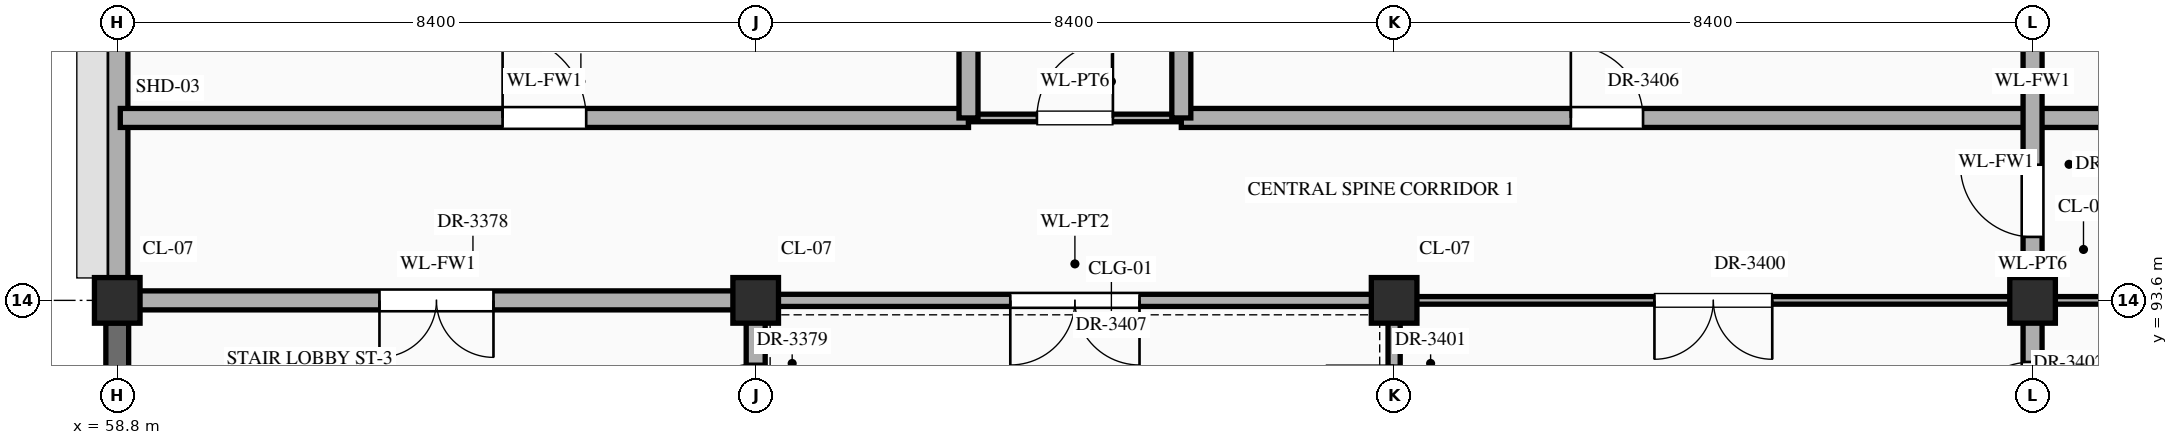
"""IFC4 building model, lengths in metres.
Left out: names, types, materials, properties, quantities, classifications, styles, units other than length and angle.
Written with IfcOpenShell. Run it as: python <this file> out.ifc"""

import sys

from ifc_helpers import new_model, si_unit, direction, frame, frame_2d, origin, origin_2d, place, context, subcontext, project, spatial, rectangle, extrude, element, fill, save


model = new_model("IFC4")
c1 = context("Model", 3, precision=1e-05, world=origin(), true_north=direction((0.0, 1.0)))
c2 = subcontext(c1, "Body", "Model", "MODEL_VIEW")
j1 = project(units=[si_unit("LENGTHUNIT", "METRE"), si_unit("PLANEANGLEUNIT", "RADIAN")], contexts=[c1])
p1 = place(None, origin())
s1 = spatial("IfcSite", under=j1, at=p1, CompositionType="ELEMENT")
p2 = place(p1, origin())
s2 = spatial("IfcBuilding", under=s1, at=p2, CompositionType="ELEMENT")
p3 = place(p2, frame((0.0, 0.0, 68.7)))
s3 = spatial("IfcBuildingStorey", under=s2, at=p3, CompositionType="ELEMENT", Elevation=68.7)
for number, where, z_axis, x_axis in (
    (1, (58.8, 93.6, 0.0), (0.0, 0.0, 1.0), (1.0, 0.0, 0.0)),
    (2, (67.2, 93.6, 0.0), (0.0, 0.0, 1.0), (1.0, 0.0, 0.0)),
    (3, (75.6, 93.6, 0.0), (0.0, 0.0, 1.0), (1.0, 0.0, 0.0)),
    (4, (84.0, 93.6, 0.0), (0.0, 0.0, 1.0), (1.0, 0.0, 0.0)),
):
    element("IfcColumn", number, at=place(p3, frame(where, z_axis=z_axis, x_axis=x_axis)), inside=s3, PredefinedType="COLUMN", context=c2, shape_type="SweptSolid", body=[
        extrude(rectangle(XDim=0.6, YDim=0.6, at=origin_2d()), origin(), (0.0, 0.0, 1.0), 4.5),
    ])
p4 = place(p3, frame((58.8, 86.695, 0.0), z_axis=(0.0, 0.0, 1.0), x_axis=(0.0, 1.0, 0.0)))
e5 = element("IfcWall", 5, at=p4, inside=s3, PredefinedType="SHEAR", context=c2, shape_type="SweptSolid", body=[
    extrude(rectangle(XDim=6.61, YDim=0.3, at=frame_2d((3.305, 0.0))), origin(), (0.0, 0.0, 1.0), 4.12),
])
p5 = place(p3, frame((58.8, 93.895, 0.0), z_axis=(0.0, 0.0, 1.0), x_axis=(0.0, 1.0, 0.0)))
e6 = element("IfcWall", 6, at=p5, inside=s3, PredefinedType="STANDARD", context=c2, shape_type="SweptSolid", body=[
    extrude(rectangle(XDim=6.61, YDim=0.28, at=frame_2d((3.305, 0.0))), origin(), (0.0, 0.0, 1.0), 3.47),
])
p6 = place(p5, frame((4.005, 0.0, 0.85)))
e7 = element("IfcOpeningElement", 7, at=p6, cuts=e6, PredefinedType="OPENING", context=c2, shape_type="SweptSolid", body=[
    extrude(rectangle(XDim=1.2, YDim=1.56, at=frame_2d((0.6, 0.78))), frame((0.0, 0.152, 0.0), z_axis=(0.0, -1.0, 0.0), x_axis=(1.0, 0.0, 0.0)), (0.0, 0.0, 1.0), 0.304),
])
p7 = place(p3, frame((58.84, 93.6, 0.0), z_axis=(0.0, 0.0, 1.0), x_axis=(1.0, 0.0, 0.0)))
e8 = element("IfcWall", 8, at=p7, inside=s3, PredefinedType="STANDARD", context=c2, shape_type="SweptSolid", body=[
    extrude(rectangle(XDim=8.36, YDim=0.25, at=frame_2d((4.18, 0.0))), origin(), (0.0, 0.0, 1.0), 3.27),
])
p8 = place(p7, frame((3.41, 0.0, 0.0)))
e9 = element("IfcOpeningElement", 9, at=p8, cuts=e8, PredefinedType="OPENING", context=c2, shape_type="SweptSolid", body=[
    extrude(rectangle(XDim=1.5, YDim=2.25, at=frame_2d((0.75, 1.125))), frame((0.0, 0.137, 0.0), z_axis=(0.0, -1.0, 0.0), x_axis=(1.0, 0.0, 0.0)), (0.0, 0.0, 1.0), 0.274),
])
p9 = place(p3, frame((67.2, 93.6, 0.0), z_axis=(0.0, 0.0, 1.0), x_axis=(1.0, 0.0, 0.0)))
e10 = element("IfcWall", 10, at=p9, inside=s3, PredefinedType="STANDARD", context=c2, shape_type="SweptSolid", body=[
    extrude(rectangle(XDim=8.4, YDim=0.16, at=frame_2d((4.2, 0.0))), origin(), (0.0, 0.0, 1.0), 3.27),
])
p10 = place(p9, frame((3.35, 0.0, 0.0)))
e11 = element("IfcOpeningElement", 11, at=p10, cuts=e10, PredefinedType="OPENING", context=c2, shape_type="SweptSolid", body=[
    extrude(rectangle(XDim=1.7, YDim=2.45, at=frame_2d((0.85, 1.225))), frame((0.0, 0.092, 0.0), z_axis=(0.0, -1.0, 0.0), x_axis=(1.0, 0.0, 0.0)), (0.0, 0.0, 1.0), 0.184),
])
p11 = place(p3, frame((75.6, 93.6, 0.0), z_axis=(0.0, 0.0, 1.0), x_axis=(1.0, 0.0, 0.0)))
e12 = element("IfcWall", 12, at=p11, inside=s3, PredefinedType="STANDARD", context=c2, shape_type="SweptSolid", body=[
    extrude(rectangle(XDim=16.8, YDim=0.1, at=frame_2d((8.4, 0.0))), origin(), (0.0, 0.0, 1.0), 3.27),
])
p12 = place(p11, frame((3.425, 0.0, 0.0)))
e13 = element("IfcOpeningElement", 13, at=p12, cuts=e12, PredefinedType="OPENING", context=c2, shape_type="SweptSolid", body=[
    extrude(rectangle(XDim=1.55, YDim=2.35, at=frame_2d((0.775, 1.175))), frame((0.0, 0.062, 0.0), z_axis=(0.0, -1.0, 0.0), x_axis=(1.0, 0.0, 0.0)), (0.0, 0.0, 1.0), 0.124),
])
p13 = place(p11, frame((11.98, 0.0, 0.0)))
e14 = element("IfcOpeningElement", 14, at=p13, cuts=e12, PredefinedType="OPENING", context=c2, shape_type="SweptSolid", body=[
    extrude(rectangle(XDim=1.24, YDim=2.3, at=frame_2d((0.62, 1.15))), frame((0.0, 0.062, 0.0), z_axis=(0.0, -1.0, 0.0), x_axis=(1.0, 0.0, 0.0)), (0.0, 0.0, 1.0), 0.124),
])
p14 = place(p3, frame((58.84, 96.0, 0.0), z_axis=(0.0, 0.0, 1.0), x_axis=(1.0, 0.0, 0.0)))
e15 = element("IfcWall", 15, at=p14, inside=s3, PredefinedType="STANDARD", context=c2, shape_type="SweptSolid", body=[
    extrude(rectangle(XDim=11.16, YDim=0.25, at=frame_2d((5.58, 0.0))), origin(), (0.0, 0.0, 1.0), 4.12),
])
p15 = place(p14, frame((5.03, 0.0, 0.0)))
e16 = element("IfcOpeningElement", 16, at=p15, cuts=e15, PredefinedType="OPENING", context=c2, shape_type="SweptSolid", body=[
    extrude(rectangle(XDim=1.1, YDim=2.2, at=frame_2d((0.55, 1.1))), frame((0.0, 0.137, 0.0), z_axis=(0.0, -1.0, 0.0), x_axis=(1.0, 0.0, 0.0)), (0.0, 0.0, 1.0), 0.274),
])
p16 = place(p3, frame((70.0, 96.0, 0.0), z_axis=(0.0, 0.0, 1.0), x_axis=(1.0, 0.0, 0.0)))
e17 = element("IfcWall", 17, at=p16, inside=s3, PredefinedType="STANDARD", context=c2, shape_type="SweptSolid", body=[
    extrude(rectangle(XDim=2.8, YDim=0.1, at=frame_2d((1.4, 0.0))), origin(), (0.0, 0.0, 1.0), 4.12),
])
p17 = place(p16, frame((0.9, 0.0, 0.0)))
e18 = element("IfcOpeningElement", 18, at=p17, cuts=e17, PredefinedType="OPENING", context=c2, shape_type="SweptSolid", body=[
    extrude(rectangle(XDim=1.0, YDim=2.25, at=frame_2d((0.5, 1.125))), frame((0.0, 0.062, 0.0), z_axis=(0.0, -1.0, 0.0), x_axis=(1.0, 0.0, 0.0)), (0.0, 0.0, 1.0), 0.124),
])
p18 = place(p3, frame((72.8, 96.0, 0.0), z_axis=(0.0, 0.0, 1.0), x_axis=(1.0, 0.0, 0.0)))
e19 = element("IfcWall", 19, at=p18, inside=s3, PredefinedType="STANDARD", context=c2, shape_type="SweptSolid", body=[
    extrude(rectangle(XDim=22.4, YDim=0.25, at=frame_2d((11.2, 0.0))), origin(), (0.0, 0.0, 1.0), 4.12),
])
p19 = place(p18, frame((5.125, 0.0, 0.0)))
e20 = element("IfcOpeningElement", 20, at=p19, cuts=e19, PredefinedType="OPENING", context=c2, shape_type="SweptSolid", body=[
    extrude(rectangle(XDim=0.95, YDim=2.15, at=frame_2d((0.475, 1.075))), frame((0.0, 0.137, 0.0), z_axis=(0.0, -1.0, 0.0), x_axis=(1.0, 0.0, 0.0)), (0.0, 0.0, 1.0), 0.274),
])
p20 = place(p18, frame((16.3, 0.0, 0.0)))
e21 = element("IfcOpeningElement", 21, at=p20, cuts=e19, PredefinedType="OPENING", context=c2, shape_type="SweptSolid", body=[
    extrude(rectangle(XDim=1.0, YDim=2.2, at=frame_2d((0.5, 1.1))), frame((0.0, 0.137, 0.0), z_axis=(0.0, -1.0, 0.0), x_axis=(1.0, 0.0, 0.0)), (0.0, 0.0, 1.0), 0.274),
])
p21 = place(p3, frame((67.2, 91.2, 0.0), z_axis=(0.0, 0.0, 1.0), x_axis=(0.0, 1.0, 0.0)))
e22 = element("IfcWall", 22, at=p21, inside=s3, PredefinedType="STANDARD", context=c2, shape_type="SweptSolid", body=[
    extrude(rectangle(XDim=2.4, YDim=0.25, at=frame_2d((1.2, 0.0))), origin(), (0.0, 0.0, 1.0), 3.37),
])
p22 = place(p21, frame((0.615, 0.0, 0.0)))
e23 = element("IfcOpeningElement", 23, at=p22, cuts=e22, PredefinedType="OPENING", context=c2, shape_type="SweptSolid", body=[
    extrude(rectangle(XDim=0.95, YDim=2.15, at=frame_2d((0.475, 1.075))), frame((0.0, 0.137, 0.0), z_axis=(0.0, -1.0, 0.0), x_axis=(1.0, 0.0, 0.0)), (0.0, 0.0, 1.0), 0.274),
])
p23 = place(p3, frame((70.0, 96.0, 0.0), z_axis=(0.0, 0.0, 1.0), x_axis=(0.0, 1.0, 0.0)))
e24 = element("IfcWall", 24, at=p23, inside=s3, PredefinedType="STANDARD", context=c2, shape_type="SweptSolid", body=[
    extrude(rectangle(XDim=4.8, YDim=0.25, at=frame_2d((2.4, 0.0))), origin(), (0.0, 0.0, 1.0), 4.12),
])
p24 = place(p23, frame((1.85, 0.0, 0.0)))
e25 = element("IfcOpeningElement", 25, at=p24, cuts=e24, PredefinedType="OPENING", context=c2, shape_type="SweptSolid", body=[
    extrude(rectangle(XDim=1.1, YDim=2.2, at=frame_2d((0.55, 1.1))), frame((0.0, 0.137, 0.0), z_axis=(0.0, -1.0, 0.0), x_axis=(1.0, 0.0, 0.0)), (0.0, 0.0, 1.0), 0.274),
])
p25 = place(p3, frame((72.8, 96.0, 0.0), z_axis=(0.0, 0.0, 1.0), x_axis=(0.0, 1.0, 0.0)))
e26 = element("IfcWall", 26, at=p25, inside=s3, PredefinedType="STANDARD", context=c2, shape_type="SweptSolid", body=[
    extrude(rectangle(XDim=4.8, YDim=0.25, at=frame_2d((2.4, 0.0))), origin(), (0.0, 0.0, 1.0), 4.12),
])
p26 = place(p25, frame((1.9, 0.0, 0.0)))
e27 = element("IfcOpeningElement", 27, at=p26, cuts=e26, PredefinedType="OPENING", context=c2, shape_type="SweptSolid", body=[
    extrude(rectangle(XDim=1.0, YDim=2.2, at=frame_2d((0.5, 1.1))), frame((0.0, 0.137, 0.0), z_axis=(0.0, -1.0, 0.0), x_axis=(1.0, 0.0, 0.0)), (0.0, 0.0, 1.0), 0.274),
])
p27 = place(p3, frame((75.6, 91.2, 0.0), z_axis=(0.0, 0.0, 1.0), x_axis=(0.0, 1.0, 0.0)))
e28 = element("IfcWall", 28, at=p27, inside=s3, PredefinedType="STANDARD", context=c2, shape_type="SweptSolid", body=[
    extrude(rectangle(XDim=2.4, YDim=0.16, at=frame_2d((1.2, 0.0))), origin(), (0.0, 0.0, 1.0), 3.37),
])
p28 = place(p27, frame((0.64, 0.0, 0.0)))
e29 = element("IfcOpeningElement", 29, at=p28, cuts=e28, PredefinedType="OPENING", context=c2, shape_type="SweptSolid", body=[
    extrude(rectangle(XDim=0.9, YDim=2.15, at=frame_2d((0.45, 1.075))), frame((0.0, 0.092, 0.0), z_axis=(0.0, -1.0, 0.0), x_axis=(1.0, 0.0, 0.0)), (0.0, 0.0, 1.0), 0.184),
])
p29 = place(p3, frame((84.0, 86.44, 0.0), z_axis=(0.0, 0.0, 1.0), x_axis=(0.0, 1.0, 0.0)))
e30 = element("IfcWall", 30, at=p29, inside=s3, PredefinedType="STANDARD", context=c2, shape_type="SweptSolid", body=[
    extrude(rectangle(XDim=17.96, YDim=0.25, at=frame_2d((8.98, 0.0))), origin(), (0.0, 0.0, 1.0), 3.37),
])
p30 = place(p29, frame((15.52, 0.0, 0.0)))
e31 = element("IfcOpeningElement", 31, at=p30, cuts=e30, PredefinedType="OPENING", context=c2, shape_type="SweptSolid", body=[
    extrude(rectangle(XDim=1.5, YDim=2.25, at=frame_2d((0.75, 1.125))), frame((0.0, 0.137, 0.0), z_axis=(0.0, -1.0, 0.0), x_axis=(1.0, 0.0, 0.0)), (0.0, 0.0, 1.0), 0.274),
])
p31 = place(p29, frame((5.35, 0.0, 0.0)))
e32 = element("IfcOpeningElement", 32, at=p31, cuts=e30, PredefinedType="OPENING", context=c2, shape_type="SweptSolid", body=[
    extrude(rectangle(XDim=1.0, YDim=2.2, at=frame_2d((0.5, 1.1))), frame((0.0, 0.137, 0.0), z_axis=(0.0, -1.0, 0.0), x_axis=(1.0, 0.0, 0.0)), (0.0, 0.0, 1.0), 0.274),
])
p32 = place(p29, frame((7.995, 0.0, 0.0)))
e33 = element("IfcOpeningElement", 33, at=p32, cuts=e30, PredefinedType="OPENING", context=c2, shape_type="SweptSolid", body=[
    extrude(rectangle(XDim=0.95, YDim=2.15, at=frame_2d((0.475, 1.075))), frame((0.0, 0.137, 0.0), z_axis=(0.0, -1.0, 0.0), x_axis=(1.0, 0.0, 0.0)), (0.0, 0.0, 1.0), 0.274),
])
p33 = place(p8, frame((1.5, 0.0, 0.0), z_axis=(0.0, 0.0, 1.0), x_axis=(-1.0, 0.0, 0.0)))
e34 = element("IfcDoor", 34, at=p33, inside=s3, OperationType="DOUBLE_DOOR_SINGLE_SWING", PredefinedType="DOOR", context=c2, shape_type="SweptSolid", body=[
    extrude(rectangle(XDim=1.5, YDim=2.25, at=frame_2d((0.75, 1.125))), frame((0.0, 0.025, 0.0), z_axis=(0.0, -1.0, 0.0), x_axis=(1.0, 0.0, 0.0)), (0.0, 0.0, 1.0), 0.05),
])
fill(e9, e34)
p34 = place(p22, origin())
e35 = element("IfcDoor", 35, at=p34, inside=s3, OperationType="SINGLE_SWING_LEFT", PredefinedType="DOOR", context=c2, shape_type="SweptSolid", body=[
    extrude(rectangle(XDim=0.95, YDim=2.15, at=frame_2d((0.475, 1.075))), frame((0.0, 0.025, 0.0), z_axis=(0.0, -1.0, 0.0), x_axis=(1.0, 0.0, 0.0)), (0.0, 0.0, 1.0), 0.05),
])
fill(e23, e35)
p35 = place(p12, frame((1.55, 0.0, 0.0), z_axis=(0.0, 0.0, 1.0), x_axis=(-1.0, 0.0, 0.0)))
e36 = element("IfcDoor", 36, at=p35, inside=s3, OperationType="DOUBLE_DOOR_SINGLE_SWING", PredefinedType="DOOR", context=c2, shape_type="SweptSolid", body=[
    extrude(rectangle(XDim=1.55, YDim=2.35, at=frame_2d((0.775, 1.175))), frame((0.0, 0.025, 0.0), z_axis=(0.0, -1.0, 0.0), x_axis=(1.0, 0.0, 0.0)), (0.0, 0.0, 1.0), 0.05),
])
fill(e13, e36)
p36 = place(p31, origin())
e37 = element("IfcDoor", 37, at=p36, inside=s3, OperationType="SINGLE_SWING_LEFT", PredefinedType="DOOR", context=c2, shape_type="SweptSolid", body=[
    extrude(rectangle(XDim=1.0, YDim=2.2, at=frame_2d((0.5, 1.1))), frame((0.0, 0.025, 0.0), z_axis=(0.0, -1.0, 0.0), x_axis=(1.0, 0.0, 0.0)), (0.0, 0.0, 1.0), 0.05),
])
fill(e32, e37)
p37 = place(p32, origin())
e38 = element("IfcDoor", 38, at=p37, inside=s3, OperationType="SINGLE_SWING_RIGHT", PredefinedType="DOOR", context=c2, shape_type="SweptSolid", body=[
    extrude(rectangle(XDim=0.95, YDim=2.15, at=frame_2d((0.475, 1.075))), frame((0.0, 0.025, 0.0), z_axis=(0.0, -1.0, 0.0), x_axis=(1.0, 0.0, 0.0)), (0.0, 0.0, 1.0), 0.05),
])
fill(e33, e38)
p38 = place(p15, origin())
e39 = element("IfcDoor", 39, at=p38, inside=s3, OperationType="SINGLE_SWING_LEFT", PredefinedType="DOOR", context=c2, shape_type="SweptSolid", body=[
    extrude(rectangle(XDim=1.1, YDim=2.2, at=frame_2d((0.55, 1.1))), frame((0.0, 0.025, 0.0), z_axis=(0.0, -1.0, 0.0), x_axis=(1.0, 0.0, 0.0)), (0.0, 0.0, 1.0), 0.05),
])
fill(e16, e39)
p39 = place(p17, origin())
e40 = element("IfcDoor", 40, at=p39, inside=s3, OperationType="SINGLE_SWING_RIGHT", PredefinedType="DOOR", context=c2, shape_type="SweptSolid", body=[
    extrude(rectangle(XDim=1.0, YDim=2.25, at=frame_2d((0.5, 1.125))), frame((0.0, 0.025, 0.0), z_axis=(0.0, -1.0, 0.0), x_axis=(1.0, 0.0, 0.0)), (0.0, 0.0, 1.0), 0.05),
])
fill(e18, e40)
p40 = place(p19, origin())
e41 = element("IfcDoor", 41, at=p40, inside=s3, OperationType="SINGLE_SWING_LEFT", PredefinedType="DOOR", context=c2, shape_type="SweptSolid", body=[
    extrude(rectangle(XDim=0.95, YDim=2.15, at=frame_2d((0.475, 1.075))), frame((0.0, 0.025, 0.0), z_axis=(0.0, -1.0, 0.0), x_axis=(1.0, 0.0, 0.0)), (0.0, 0.0, 1.0), 0.05),
])
fill(e20, e41)
p41 = place(p10, frame((1.7, 0.0, 0.0), z_axis=(0.0, 0.0, 1.0), x_axis=(-1.0, 0.0, 0.0)))
e42 = element("IfcDoor", 42, at=p41, inside=s3, OperationType="DOUBLE_DOOR_SINGLE_SWING", PredefinedType="DOOR", context=c2, shape_type="SweptSolid", body=[
    extrude(rectangle(XDim=1.7, YDim=2.45, at=frame_2d((0.85, 1.225))), frame((0.0, 0.025, 0.0), z_axis=(0.0, -1.0, 0.0), x_axis=(1.0, 0.0, 0.0)), (0.0, 0.0, 1.0), 0.05),
])
fill(e11, e42)
save(model, sys.argv[1])
